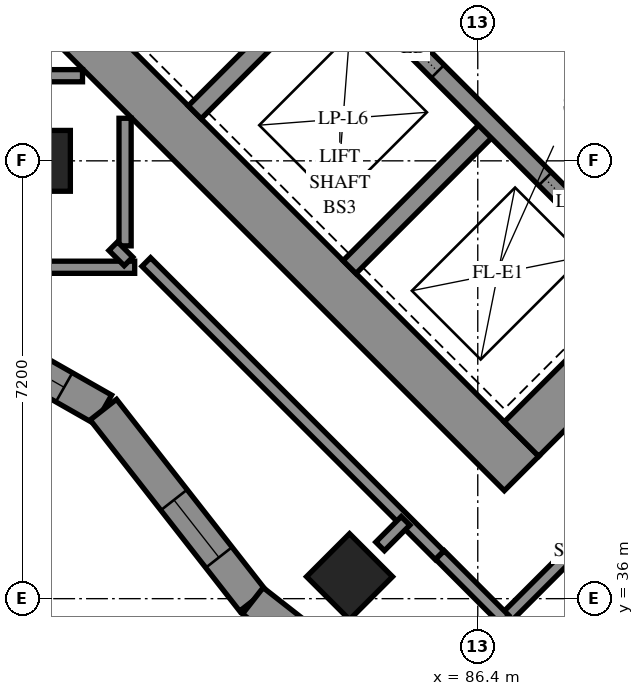
"""IFC4 building model, lengths in metres.
Left out: names, types, materials, properties, quantities, classifications, styles, units other than length and angle.
Written with IfcOpenShell. Run it as: python <this file> out.ifc"""

import sys

from ifc_helpers import new_model, si_unit, direction, frame, frame_2d, origin, origin_2d, place, context, subcontext, project, spatial, polyline, rectangle, outline, extrude, element, fill, save


model = new_model("IFC4")
c1 = context("Model", 3, precision=1e-05, world=origin(), true_north=direction((0.0, 1.0)))
c2 = subcontext(c1, "Body", "Model", "MODEL_VIEW")
j1 = project(units=[si_unit("LENGTHUNIT", "METRE"), si_unit("PLANEANGLEUNIT", "RADIAN")], contexts=[c1])
p1 = place(None, origin())
s1 = spatial("IfcSite", under=j1, at=p1, CompositionType="ELEMENT")
p2 = place(p1, origin())
s2 = spatial("IfcBuilding", under=s1, at=p2, CompositionType="ELEMENT")
p3 = place(p2, frame((0.0, 0.0, 101.6)))
s3 = spatial("IfcBuildingStorey", under=s2, at=p3, CompositionType="ELEMENT", Elevation=101.6)
for number, where, z_axis, x_axis in (
    (1, (79.2, 43.2, 0.0), (0.0, 0.0, 1.0), (1.0, 0.0, 0.0)),
    (2, (84.291, 36.362, 0.0), (0.0, 0.0, 1.0), (0.707, -0.707, 0.0)),
):
    element("IfcColumn", number, at=place(p3, frame(where, z_axis=z_axis, x_axis=x_axis)), inside=s3, PredefinedType="COLUMN", context=c2, shape_type="SweptSolid", body=[
        extrude(rectangle(XDim=1.0, YDim=1.0, at=origin_2d()), origin(), (0.0, 0.0, 1.0), 3.1),
    ])
p4 = place(p3, frame((75.806, 49.373, -0.3), z_axis=(0.0, 0.0, 1.0), x_axis=(0.7071067812, -0.7071067812, 0.0)))
e3 = element("IfcWall", 3, at=p4, inside=s3, PredefinedType="SHEAR", context=c2, shape_type="SweptSolid", body=[
    extrude(rectangle(XDim=16.0, YDim=0.8, at=frame_2d((8.0, 0.0))), origin(), (0.0, 0.0, 1.0), 2.7),
])
p5 = place(p3, frame((87.12, 38.625, -0.3), z_axis=(0.0, 0.0, 1.0), x_axis=(0.7071067812, 0.7071067812, 0.0)))
e4 = element("IfcWall", 4, at=p5, inside=s3, PredefinedType="SHEAR", context=c2, shape_type="SweptSolid", body=[
    extrude(rectangle(XDim=14.4, YDim=0.8, at=frame_2d((7.2, 0.0))), origin(), (0.0, 0.0, 1.0), 2.7),
])
p6 = place(p5, frame((4.55, 0.0, 0.3)))
e5 = element("IfcOpeningElement", 5, at=p6, cuts=e4, PredefinedType="OPENING", context=c2, shape_type="SweptSolid", body=[
    extrude(rectangle(XDim=1.1, YDim=2.1, at=frame_2d((0.55, 1.05))), frame((0.0, 0.41, 0.0), z_axis=(0.0, -1.0, 0.0), x_axis=(1.0, 0.0, 0.0)), (0.0, 0.0, 1.0), 0.82),
])
p7 = place(p5, frame((11.35, 0.0, 0.3)))
e6 = element("IfcOpeningElement", 6, at=p7, cuts=e4, PredefinedType="OPENING", context=c2, shape_type="SweptSolid", body=[
    extrude(rectangle(XDim=1.1, YDim=2.1, at=frame_2d((0.55, 1.05))), frame((0.0, 0.41, 0.0), z_axis=(0.0, -1.0, 0.0), x_axis=(1.0, 0.0, 0.0)), (0.0, 0.0, 1.0), 0.82),
])
for number, where, z_axis, x_axis in (
    (7, (81.746, 43.999, 0.0), (0.0, 0.0, 1.0), (0.707, 0.707, 0.0)),
    (8, (84.291, 41.453, 0.0), (0.0, 0.0, 1.0), (0.707, 0.707, 0.0)),
):
    element("IfcWall", number, at=place(p3, frame(where, z_axis=z_axis, x_axis=x_axis)), inside=s3, PredefinedType="SOLIDWALL", context=c2, shape_type="SweptSolid", body=[
        extrude(rectangle(XDim=3.3, YDim=0.3, at=frame_2d((1.65, 0.0))), origin(), (0.0, 0.0, 1.0), 3.1),
    ])
p8 = place(p3, frame((78.988, 51.423, 0.0), z_axis=(0.0, 0.0, 1.0), x_axis=(0.7071067812, -0.7071067812, 0.0)))
e9 = element("IfcWall", 9, at=p8, inside=s3, PredefinedType="SOLIDWALL", context=c2, shape_type="SweptSolid", body=[
    extrude(rectangle(XDim=14.4, YDim=0.3, at=frame_2d((7.2, 0.0))), origin(), (0.0, 0.0, 1.0), 3.1),
])
p9 = place(p8, frame((1.25, 0.0, 0.0)))
e10 = element("IfcOpeningElement", 10, at=p9, cuts=e9, PredefinedType="OPENING", context=c2, shape_type="SweptSolid", body=[
    extrude(rectangle(XDim=1.1, YDim=2.1, at=frame_2d((0.55, 1.05))), frame((0.0, 0.16, 0.0), z_axis=(0.0, -1.0, 0.0), x_axis=(1.0, 0.0, 0.0)), (0.0, 0.0, 1.0), 0.32),
])
p10 = place(p8, frame((4.85, 0.0, 0.0)))
e11 = element("IfcOpeningElement", 11, at=p10, cuts=e9, PredefinedType="OPENING", context=c2, shape_type="SweptSolid", body=[
    extrude(rectangle(XDim=1.1, YDim=2.1, at=frame_2d((0.55, 1.05))), frame((0.0, 0.16, 0.0), z_axis=(0.0, -1.0, 0.0), x_axis=(1.0, 0.0, 0.0)), (0.0, 0.0, 1.0), 0.32),
])
p11 = place(p8, frame((8.45, 0.0, 0.0)))
e12 = element("IfcOpeningElement", 12, at=p11, cuts=e9, PredefinedType="OPENING", context=c2, shape_type="SweptSolid", body=[
    extrude(rectangle(XDim=1.1, YDim=2.1, at=frame_2d((0.55, 1.05))), frame((0.0, 0.16, 0.0), z_axis=(0.0, -1.0, 0.0), x_axis=(1.0, 0.0, 0.0)), (0.0, 0.0, 1.0), 0.32),
])
p12 = place(p8, frame((12.05, 0.0, 0.0)))
e13 = element("IfcOpeningElement", 13, at=p12, cuts=e9, PredefinedType="OPENING", context=c2, shape_type="SweptSolid", body=[
    extrude(rectangle(XDim=1.1, YDim=2.1, at=frame_2d((0.55, 1.05))), frame((0.0, 0.16, 0.0), z_axis=(0.0, -1.0, 0.0), x_axis=(1.0, 0.0, 0.0)), (0.0, 0.0, 1.0), 0.32),
])
p13 = place(p3, frame((81.534, 53.969, 0.0), z_axis=(0.0, 0.0, 1.0), x_axis=(0.707103309, -0.7071102534, 0.0)))
e14 = element("IfcWall", 14, at=p13, inside=s3, PredefinedType="SOLIDWALL", context=c2, shape_type="SweptSolid", body=[
    extrude(rectangle(XDim=14.4, YDim=0.3, at=frame_2d((7.2, 0.0))), origin(), (0.0, 0.0, 1.0), 3.1),
])
p14 = place(p13, frame((12.05, 0.0, 0.0)))
e15 = element("IfcOpeningElement", 15, at=p14, cuts=e14, PredefinedType="OPENING", context=c2, shape_type="SweptSolid", body=[
    extrude(rectangle(XDim=1.1, YDim=2.1, at=frame_2d((0.55, 1.05))), frame((0.0, 0.16, 0.0), z_axis=(0.0, -1.0, 0.0), x_axis=(1.0, 0.0, 0.0)), (0.0, 0.0, 1.0), 0.32),
])
p15 = place(p3, frame((76.618, 41.171, 0.0), z_axis=(0.0, 0.0, 1.0), x_axis=(0.8690948676, -0.4946454398, 0.0)))
e16 = element("IfcWall", 16, at=p15, inside=s3, PredefinedType="SOLIDWALL", context=c2, shape_type="SweptSolid", body=[
    extrude(outline(polyline([(0.029, -0.275), (4.116, -0.275), (4.224, 0.275), (-0.029, 0.275), (0.029, -0.275)])), origin(), (0.0, 0.0, 1.0), 3.1),
])
p16 = place(p15, frame((0.343, 0.0, 0.5)))
e17 = element("IfcOpeningElement", 17, at=p16, cuts=e16, PredefinedType="OPENING", context=c2, shape_type="SweptSolid", body=[
    extrude(rectangle(XDim=1.2, YDim=2.45, at=frame_2d((0.6, 1.225))), frame((0.0, 0.285, 0.0), z_axis=(0.0, -1.0, 0.0), x_axis=(1.0, 0.0, 0.0)), (0.0, 0.0, 1.0), 0.57),
])
p17 = place(p15, frame((2.228, 0.0, 0.5)))
e18 = element("IfcOpeningElement", 18, at=p17, cuts=e16, PredefinedType="OPENING", context=c2, shape_type="SweptSolid", body=[
    extrude(rectangle(XDim=1.2, YDim=2.45, at=frame_2d((0.6, 1.225))), frame((0.0, 0.285, 0.0), z_axis=(0.0, -1.0, 0.0), x_axis=(1.0, 0.0, 0.0)), (0.0, 0.0, 1.0), 0.57),
])
p18 = place(p3, frame((80.243, 39.109, 0.0), z_axis=(0.0, 0.0, 1.0), x_axis=(0.6160271492, -0.7877249212, 0.0)))
e19 = element("IfcWall", 19, at=p18, inside=s3, PredefinedType="SOLIDWALL", context=c2, shape_type="SweptSolid", body=[
    extrude(outline(polyline([(0.054, -0.275), (4.024, -0.275), (3.957, 0.275), (-0.054, 0.275), (0.054, -0.275)])), origin(), (0.0, 0.0, 1.0), 3.1),
])
p19 = place(p18, frame((1.886, 0.0, 0.5)))
e20 = element("IfcOpeningElement", 20, at=p19, cuts=e19, PredefinedType="OPENING", context=c2, shape_type="SweptSolid", body=[
    extrude(rectangle(XDim=1.2, YDim=2.45, at=frame_2d((0.6, 1.225))), frame((0.0, 0.285, 0.0), z_axis=(0.0, -1.0, 0.0), x_axis=(1.0, 0.0, 0.0)), (0.0, 0.0, 1.0), 0.57),
])
p20 = place(p3, frame((82.701, 35.965, 0.0), z_axis=(0.0, 0.0, 1.0), x_axis=(0.7877313819, -0.6160188877, 0.0)))
e21 = element("IfcWall", 21, at=p20, inside=s3, PredefinedType="SOLIDWALL", context=c2, shape_type="SweptSolid", body=[
    extrude(outline(polyline([(-0.034, -0.275), (3.936, -0.275), (4.004, 0.275), (0.034, 0.275), (-0.034, -0.275)])), origin(), (0.0, 0.0, 1.0), 3.1),
])
p21 = place(p20, frame((1.71, 0.0, 0.5)))
e22 = element("IfcOpeningElement", 22, at=p21, cuts=e21, PredefinedType="OPENING", context=c2, shape_type="SweptSolid", body=[
    extrude(rectangle(XDim=1.2, YDim=2.45, at=frame_2d((0.6, 1.225))), frame((0.0, 0.285, 0.0), z_axis=(0.0, -1.0, 0.0), x_axis=(1.0, 0.0, 0.0)), (0.0, 0.0, 1.0), 0.57),
])
p22 = place(p3, frame((86.835, 35.655, 0.0), z_axis=(0.0, 0.0, 1.0), x_axis=(0.7071067812, 0.7071067812, 0.0)))
e23 = element("IfcWall", 23, at=p22, inside=s3, PredefinedType="PARTITIONING", context=c2, shape_type="SweptSolid", body=[
    extrude(rectangle(XDim=7.3, YDim=0.2, at=frame_2d((3.65, 0.0))), origin(), (0.0, 0.0, 1.0), 3.1),
])
p23 = place(p22, frame((6.046, 0.0, 0.0)))
e24 = element("IfcOpeningElement", 24, at=p23, cuts=e23, PredefinedType="OPENING", context=c2, shape_type="SweptSolid", body=[
    extrude(rectangle(XDim=1.0, YDim=2.1, at=frame_2d((0.5, 1.05))), frame((0.0, 0.11, 0.0), z_axis=(0.0, -1.0, 0.0), x_axis=(1.0, 0.0, 0.0)), (0.0, 0.0, 1.0), 0.22),
])
p24 = place(p3, frame((86.337, 33.315, 0.0), z_axis=(0.0, 0.0, 1.0), x_axis=(0.7069692223, 0.7072443133, 0.0)))
e25 = element("IfcWall", 25, at=p24, inside=s3, PredefinedType="PARTITIONING", context=c2, shape_type="SweptSolid", body=[
    extrude(rectangle(XDim=6.907, YDim=0.2, at=frame_2d((3.453, 0.0))), origin(), (0.0, 0.0, 1.0), 3.1),
])
p25 = place(p3, frame((80.948, 41.536, 0.0), z_axis=(0.0, 0.0, 1.0), x_axis=(0.7071067812, -0.7071067812, 0.0)))
e26 = element("IfcWall", 26, at=p25, inside=s3, PredefinedType="PARTITIONING", context=c2, shape_type="SweptSolid", body=[
    extrude(rectangle(XDim=6.822, YDim=0.2, at=frame_2d((3.411, 0.0))), origin(), (0.0, 0.0, 1.0), 3.1),
])
for number, where, z_axis, x_axis in (
    (27, (77.802, 44.6, 0.0), (0.0, 0.0, 1.0), (1.0, 0.0, 0.0)),
    (28, (80.6, 41.802, 0.0), (0.0, 0.0, 1.0), (0.0, 1.0, 0.0)),
):
    element("IfcWall", number, at=place(p3, frame(where, z_axis=z_axis, x_axis=x_axis)), inside=s3, PredefinedType="PARTITIONING", context=c2, shape_type="SweptSolid", body=[
        extrude(rectangle(XDim=2.098, YDim=0.2, at=frame_2d((1.049, 0.0))), origin(), (0.0, 0.0, 1.0), 3.1),
    ])
p26 = place(p3, frame((79.198, 41.45, 0.0), z_axis=(0.0, 0.0, 1.0), x_axis=(1.0, 0.0, 0.0)))
e29 = element("IfcWall", 29, at=p26, inside=s3, PredefinedType="PARTITIONING", context=c2, shape_type="SweptSolid", body=[
    extrude(rectangle(XDim=1.56, YDim=0.2, at=frame_2d((0.78, 0.0))), origin(), (0.0, 0.0, 1.0), 3.1),
])
p27 = place(p3, frame((85.778, 36.718, 0.0), z_axis=(0.0, 0.0, 1.0), x_axis=(0.7064400143, -0.70777292, 0.0)))
e30 = element("IfcWall", 30, at=p27, inside=s3, PredefinedType="PARTITIONING", context=c2, shape_type="SweptSolid", body=[
    extrude(rectangle(XDim=1.5, YDim=0.2, at=frame_2d((0.75, 0.0))), origin(), (0.0, 0.0, 1.0), 3.1),
])
p28 = place(p3, frame((84.794, 36.86, 0.0), z_axis=(0.0, 0.0, 1.0), x_axis=(0.7054171665, 0.7087923682, 0.0)))
e31 = element("IfcWall", 31, at=p28, inside=s3, PredefinedType="PARTITIONING", context=c2, shape_type="SweptSolid", body=[
    extrude(rectangle(XDim=0.593, YDim=0.2, at=frame_2d((0.296, 0.0))), origin(), (0.0, 0.0, 1.0), 3.1),
])
p29 = place(p3, frame((80.405, 41.797, 0.0), z_axis=(0.0, 0.0, 1.0), x_axis=(0.7071067812, -0.7071067812, 0.0)))
e32 = element("IfcWall", 32, at=p29, inside=s3, PredefinedType="PARTITIONING", context=c2, shape_type="SweptSolid", body=[
    extrude(rectangle(XDim=0.355, YDim=0.2, at=frame_2d((0.177, 0.0))), origin(), (0.0, 0.0, 1.0), 3.1),
])
p30 = place(p17, origin())
e33 = element("IfcWindow", 33, at=p30, inside=s3, PartitioningType="SINGLE_PANEL", PredefinedType="WINDOW", context=c2, shape_type="SweptSolid", body=[
    extrude(rectangle(XDim=1.2, YDim=2.45, at=frame_2d((0.6, 1.225))), frame((0.0, 0.155, 0.0), z_axis=(0.0, -1.0, 0.0), x_axis=(1.0, 0.0, 0.0)), (0.0, 0.0, 1.0), 0.06),
])
fill(e18, e33)
p31 = place(p19, origin())
e34 = element("IfcWindow", 34, at=p31, inside=s3, PartitioningType="SINGLE_PANEL", PredefinedType="WINDOW", context=c2, shape_type="SweptSolid", body=[
    extrude(rectangle(XDim=1.2, YDim=2.45, at=frame_2d((0.6, 1.225))), frame((0.0, 0.155, 0.0), z_axis=(0.0, -1.0, 0.0), x_axis=(1.0, 0.0, 0.0)), (0.0, 0.0, 1.0), 0.06),
])
fill(e20, e34)
p32 = place(p11, origin())
e35 = element("IfcDoor", 35, at=p32, inside=s3, OperationType="SLIDING_TO_LEFT", PredefinedType="DOOR", context=c2, shape_type="SweptSolid", body=[
    extrude(rectangle(XDim=1.1, YDim=2.1, at=frame_2d((0.55, 1.05))), frame((0.0, 0.025, 0.0), z_axis=(0.0, -1.0, 0.0), x_axis=(1.0, 0.0, 0.0)), (0.0, 0.0, 1.0), 0.05),
])
fill(e12, e35)
p33 = place(p12, origin())
e36 = element("IfcDoor", 36, at=p33, inside=s3, OperationType="SLIDING_TO_RIGHT", PredefinedType="DOOR", context=c2, shape_type="SweptSolid", body=[
    extrude(rectangle(XDim=1.1, YDim=2.1, at=frame_2d((0.55, 1.05))), frame((0.0, 0.025, 0.0), z_axis=(0.0, -1.0, 0.0), x_axis=(1.0, 0.0, 0.0)), (0.0, 0.0, 1.0), 0.05),
])
fill(e13, e36)
save(model, sys.argv[1])
